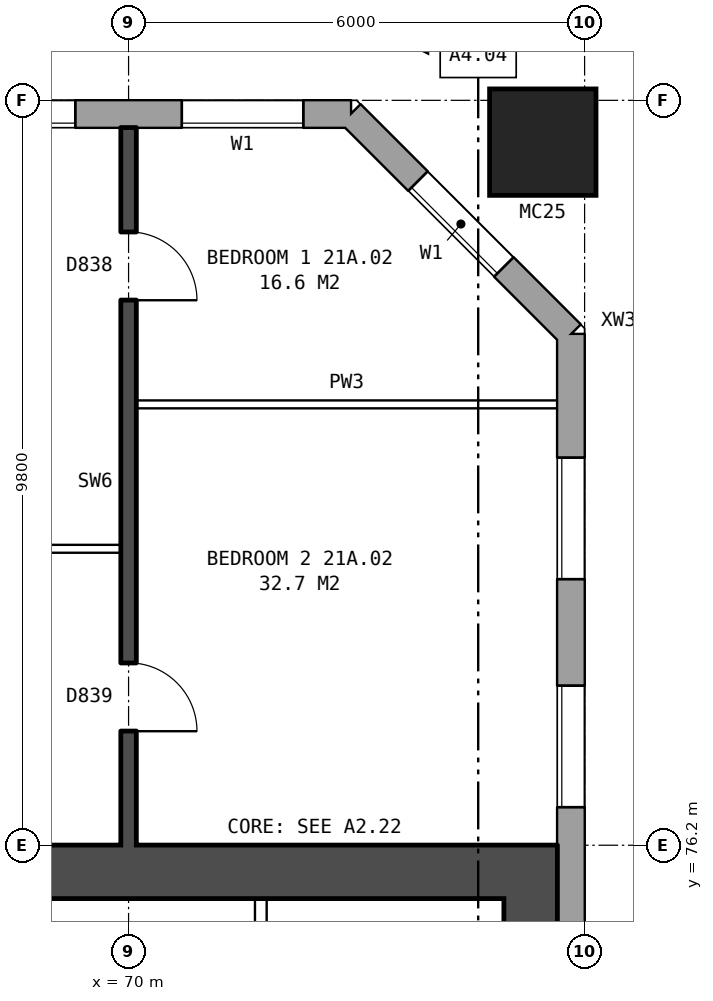
"""IFC4 building model, lengths in metres.
Left out: names, types, materials, properties, quantities, classifications, styles, units other than length and angle.
Written with IfcOpenShell. Run it as: python <this file> out.ifc"""

import sys

from ifc_helpers import new_model, si_unit, direction, frame, frame_2d, origin, origin_2d, place, context, subcontext, project, spatial, rectangle, hollow_rectangle, extrude, element, fill, save


model = new_model("IFC4")
c1 = context("Model", 3, precision=1e-05, world=origin(), true_north=direction((0.0, 1.0)))
c2 = subcontext(c1, "Body", "Model", "MODEL_VIEW")
j1 = project(units=[si_unit("LENGTHUNIT", "METRE"), si_unit("PLANEANGLEUNIT", "RADIAN")], contexts=[c1])
p1 = place(None, origin())
s1 = spatial("IfcSite", under=j1, at=p1, CompositionType="ELEMENT")
p2 = place(p1, origin())
s2 = spatial("IfcBuilding", under=s1, at=p2, CompositionType="ELEMENT")
p3 = place(p2, frame((0.0, 0.0, 77.8)))
s3 = spatial("IfcBuildingStorey", under=s2, at=p3, CompositionType="ELEMENT", Elevation=77.8)
p4 = place(p3, frame((75.45, 85.45, 0.0), z_axis=(0.0, 0.0, 1.0), x_axis=(1.0, 0.0, 0.0)))
e1 = element("IfcColumn", 1, at=p4, inside=s3, PredefinedType="COLUMN", context=c2, shape_type="SweptSolid", body=[
    extrude(hollow_rectangle(XDim=1.4, YDim=1.4, WallThickness=0.075, at=origin_2d()), origin(), (0.0, 0.0, 1.0), 3.1),
])
p5 = place(p3, frame((75.82, 57.075, 0.0), z_axis=(0.0, 0.0, 1.0), x_axis=(0.0, 1.0, 0.0)))
e2 = element("IfcWall", 2, at=p5, inside=s3, PredefinedType="STANDARD", context=c2, shape_type="SweptSolid", body=[
    extrude(rectangle(XDim=25.851, YDim=0.36, at=frame_2d((12.925, 0.0))), origin(), (0.0, 0.0, 1.0), 2.85),
])
p6 = place(p5, frame((1.625, 0.0, 0.8)))
e3 = element("IfcOpeningElement", 3, at=p6, cuts=e2, PredefinedType="OPENING", context=c2, shape_type="SweptSolid", body=[
    extrude(rectangle(XDim=1.6, YDim=1.8, at=frame_2d((0.8, 0.9))), frame((0.0, 0.19, 0.0), z_axis=(0.0, -1.0, 0.0), x_axis=(1.0, 0.0, 0.0)), (0.0, 0.0, 1.0), 0.38),
])
p7 = place(p5, frame((4.625, 0.0, 0.8)))
e4 = element("IfcOpeningElement", 4, at=p7, cuts=e2, PredefinedType="OPENING", context=c2, shape_type="SweptSolid", body=[
    extrude(rectangle(XDim=1.6, YDim=1.8, at=frame_2d((0.8, 0.9))), frame((0.0, 0.19, 0.0), z_axis=(0.0, -1.0, 0.0), x_axis=(1.0, 0.0, 0.0)), (0.0, 0.0, 1.0), 0.38),
])
p8 = place(p5, frame((19.625, 0.0, 0.8)))
e5 = element("IfcOpeningElement", 5, at=p8, cuts=e2, PredefinedType="OPENING", context=c2, shape_type="SweptSolid", body=[
    extrude(rectangle(XDim=1.6, YDim=1.8, at=frame_2d((0.8, 0.9))), frame((0.0, 0.19, 0.0), z_axis=(0.0, -1.0, 0.0), x_axis=(1.0, 0.0, 0.0)), (0.0, 0.0, 1.0), 0.38),
])
p9 = place(p5, frame((22.625, 0.0, 0.8)))
e6 = element("IfcOpeningElement", 6, at=p9, cuts=e2, PredefinedType="OPENING", context=c2, shape_type="SweptSolid", body=[
    extrude(rectangle(XDim=1.6, YDim=1.8, at=frame_2d((0.8, 0.9))), frame((0.0, 0.19, 0.0), z_axis=(0.0, -1.0, 0.0), x_axis=(1.0, 0.0, 0.0)), (0.0, 0.0, 1.0), 0.38),
])
p10 = place(p3, frame((75.82, 82.925, 0.0), z_axis=(0.0, 0.0, 1.0), x_axis=(-0.707106781187, 0.707106781187, 0.0)))
e7 = element("IfcWall", 7, at=p10, inside=s3, PredefinedType="STANDARD", context=c2, shape_type="SweptSolid", body=[
    extrude(rectangle(XDim=4.094, YDim=0.36, at=frame_2d((2.047, 0.0))), origin(), (0.0, 0.0, 1.0), 2.85),
])
p11 = place(p10, frame((1.247, 0.0, 0.8)))
e8 = element("IfcOpeningElement", 8, at=p11, cuts=e7, PredefinedType="OPENING", context=c2, shape_type="SweptSolid", body=[
    extrude(rectangle(XDim=1.6, YDim=1.8, at=frame_2d((0.8, 0.9))), frame((0.0, 0.19, 0.0), z_axis=(0.0, -1.0, 0.0), x_axis=(1.0, 0.0, 0.0)), (0.0, 0.0, 1.0), 0.38),
])
p12 = place(p3, frame((72.925, 85.82, 0.0), z_axis=(0.0, 0.0, 1.0), x_axis=(-1.0, 0.0, 0.0)))
e9 = element("IfcWall", 9, at=p12, inside=s3, PredefinedType="STANDARD", context=c2, shape_type="SweptSolid", body=[
    extrude(rectangle(XDim=46.601, YDim=0.36, at=frame_2d((23.3, 0.0))), origin(), (0.0, 0.0, 1.0), 2.85),
])
p13 = place(p12, frame((0.625, 0.0, 0.8)))
e10 = element("IfcOpeningElement", 10, at=p13, cuts=e9, PredefinedType="OPENING", context=c2, shape_type="SweptSolid", body=[
    extrude(rectangle(XDim=1.6, YDim=1.8, at=frame_2d((0.8, 0.9))), frame((0.0, 0.19, 0.0), z_axis=(0.0, -1.0, 0.0), x_axis=(1.0, 0.0, 0.0)), (0.0, 0.0, 1.0), 0.38),
])
p14 = place(p12, frame((3.625, 0.0, 0.8)))
e11 = element("IfcOpeningElement", 11, at=p14, cuts=e9, PredefinedType="OPENING", context=c2, shape_type="SweptSolid", body=[
    extrude(rectangle(XDim=1.6, YDim=1.8, at=frame_2d((0.8, 0.9))), frame((0.0, 0.19, 0.0), z_axis=(0.0, -1.0, 0.0), x_axis=(1.0, 0.0, 0.0)), (0.0, 0.0, 1.0), 0.38),
])
p15 = place(p12, frame((6.625, 0.0, 0.8)))
e12 = element("IfcOpeningElement", 12, at=p15, cuts=e9, PredefinedType="OPENING", context=c2, shape_type="SweptSolid", body=[
    extrude(rectangle(XDim=1.6, YDim=1.8, at=frame_2d((0.8, 0.9))), frame((0.0, 0.19, 0.0), z_axis=(0.0, -1.0, 0.0), x_axis=(1.0, 0.0, 0.0)), (0.0, 0.0, 1.0), 0.38),
])
p16 = place(p12, frame((9.125, 0.0, 1.65)))
e13 = element("IfcOpeningElement", 13, at=p16, cuts=e9, PredefinedType="OPENING", context=c2, shape_type="SweptSolid", body=[
    extrude(rectangle(XDim=1.4, YDim=0.9, at=frame_2d((0.7, 0.45))), frame((0.0, 0.19, 0.0), z_axis=(0.0, -1.0, 0.0), x_axis=(1.0, 0.0, 0.0)), (0.0, 0.0, 1.0), 0.38),
])
p17 = place(p12, frame((12.625, 0.0, 0.8)))
e14 = element("IfcOpeningElement", 14, at=p17, cuts=e9, PredefinedType="OPENING", context=c2, shape_type="SweptSolid", body=[
    extrude(rectangle(XDim=1.6, YDim=1.8, at=frame_2d((0.8, 0.9))), frame((0.0, 0.19, 0.0), z_axis=(0.0, -1.0, 0.0), x_axis=(1.0, 0.0, 0.0)), (0.0, 0.0, 1.0), 0.38),
])
p18 = place(p12, frame((15.625, 0.0, 0.8)))
e15 = element("IfcOpeningElement", 15, at=p18, cuts=e9, PredefinedType="OPENING", context=c2, shape_type="SweptSolid", body=[
    extrude(rectangle(XDim=1.6, YDim=1.8, at=frame_2d((0.8, 0.9))), frame((0.0, 0.19, 0.0), z_axis=(0.0, -1.0, 0.0), x_axis=(1.0, 0.0, 0.0)), (0.0, 0.0, 1.0), 0.38),
])
p19 = place(p12, frame((18.625, 0.0, 0.8)))
e16 = element("IfcOpeningElement", 16, at=p19, cuts=e9, PredefinedType="OPENING", context=c2, shape_type="SweptSolid", body=[
    extrude(rectangle(XDim=1.6, YDim=1.8, at=frame_2d((0.8, 0.9))), frame((0.0, 0.19, 0.0), z_axis=(0.0, -1.0, 0.0), x_axis=(1.0, 0.0, 0.0)), (0.0, 0.0, 1.0), 0.38),
])
p20 = place(p12, frame((21.625, 0.0, 0.8)))
e17 = element("IfcOpeningElement", 17, at=p20, cuts=e9, PredefinedType="OPENING", context=c2, shape_type="SweptSolid", body=[
    extrude(rectangle(XDim=1.6, YDim=1.8, at=frame_2d((0.8, 0.9))), frame((0.0, 0.19, 0.0), z_axis=(0.0, -1.0, 0.0), x_axis=(1.0, 0.0, 0.0)), (0.0, 0.0, 1.0), 0.38),
])
p21 = place(p12, frame((24.625, 0.0, 0.8)))
e18 = element("IfcOpeningElement", 18, at=p21, cuts=e9, PredefinedType="OPENING", context=c2, shape_type="SweptSolid", body=[
    extrude(rectangle(XDim=1.6, YDim=1.8, at=frame_2d((0.8, 0.9))), frame((0.0, 0.19, 0.0), z_axis=(0.0, -1.0, 0.0), x_axis=(1.0, 0.0, 0.0)), (0.0, 0.0, 1.0), 0.38),
])
p22 = place(p12, frame((27.625, 0.0, 0.8)))
e19 = element("IfcOpeningElement", 19, at=p22, cuts=e9, PredefinedType="OPENING", context=c2, shape_type="SweptSolid", body=[
    extrude(rectangle(XDim=1.6, YDim=1.8, at=frame_2d((0.8, 0.9))), frame((0.0, 0.19, 0.0), z_axis=(0.0, -1.0, 0.0), x_axis=(1.0, 0.0, 0.0)), (0.0, 0.0, 1.0), 0.38),
])
p23 = place(p12, frame((30.625, 0.0, 0.8)))
e20 = element("IfcOpeningElement", 20, at=p23, cuts=e9, PredefinedType="OPENING", context=c2, shape_type="SweptSolid", body=[
    extrude(rectangle(XDim=1.6, YDim=1.8, at=frame_2d((0.8, 0.9))), frame((0.0, 0.19, 0.0), z_axis=(0.0, -1.0, 0.0), x_axis=(1.0, 0.0, 0.0)), (0.0, 0.0, 1.0), 0.38),
])
p24 = place(p12, frame((33.125, 0.0, 0.75)))
e21 = element("IfcOpeningElement", 21, at=p24, cuts=e9, PredefinedType="OPENING", context=c2, shape_type="SweptSolid", body=[
    extrude(rectangle(XDim=0.6, YDim=1.8, at=frame_2d((0.3, 0.9))), frame((0.0, 0.19, 0.0), z_axis=(0.0, -1.0, 0.0), x_axis=(1.0, 0.0, 0.0)), (0.0, 0.0, 1.0), 0.38),
])
p25 = place(p12, frame((36.125, 0.0, 1.6)))
e22 = element("IfcOpeningElement", 22, at=p25, cuts=e9, PredefinedType="OPENING", context=c2, shape_type="SweptSolid", body=[
    extrude(rectangle(XDim=0.6, YDim=0.9, at=frame_2d((0.3, 0.45))), frame((0.0, 0.19, 0.0), z_axis=(0.0, -1.0, 0.0), x_axis=(1.0, 0.0, 0.0)), (0.0, 0.0, 1.0), 0.38),
])
p26 = place(p12, frame((39.625, 0.0, 0.8)))
e23 = element("IfcOpeningElement", 23, at=p26, cuts=e9, PredefinedType="OPENING", context=c2, shape_type="SweptSolid", body=[
    extrude(rectangle(XDim=1.6, YDim=1.8, at=frame_2d((0.8, 0.9))), frame((0.0, 0.19, 0.0), z_axis=(0.0, -1.0, 0.0), x_axis=(1.0, 0.0, 0.0)), (0.0, 0.0, 1.0), 0.38),
])
p27 = place(p12, frame((42.625, 0.0, 0.8)))
e24 = element("IfcOpeningElement", 24, at=p27, cuts=e9, PredefinedType="OPENING", context=c2, shape_type="SweptSolid", body=[
    extrude(rectangle(XDim=1.6, YDim=1.8, at=frame_2d((0.8, 0.9))), frame((0.0, 0.19, 0.0), z_axis=(0.0, -1.0, 0.0), x_axis=(1.0, 0.0, 0.0)), (0.0, 0.0, 1.0), 0.38),
])
p28 = place(p12, frame((11.125, 0.0, 0.15)))
e25 = element("IfcOpeningElement", 25, at=p28, cuts=e9, PredefinedType="OPENING", context=c2, shape_type="SweptSolid", body=[
    extrude(rectangle(XDim=0.6, YDim=0.9, at=frame_2d((0.3, 0.45))), frame((0.0, 0.19, 0.0), z_axis=(0.0, -1.0, 0.0), x_axis=(1.0, 0.0, 0.0)), (0.0, 0.0, 1.0), 0.38),
])
p29 = place(p12, frame((34.025, 0.0, 0.65)))
e26 = element("IfcOpeningElement", 26, at=p29, cuts=e9, PredefinedType="OPENING", context=c2, shape_type="SweptSolid", body=[
    extrude(rectangle(XDim=0.8, YDim=0.9, at=frame_2d((0.4, 0.45))), frame((0.0, 0.19, 0.0), z_axis=(0.0, -1.0, 0.0), x_axis=(1.0, 0.0, 0.0)), (0.0, 0.0, 1.0), 0.38),
])
p30 = place(p12, frame((37.025, 0.0, 0.8)))
e27 = element("IfcOpeningElement", 27, at=p30, cuts=e9, PredefinedType="OPENING", context=c2, shape_type="SweptSolid", body=[
    extrude(rectangle(XDim=1.6, YDim=1.8, at=frame_2d((0.8, 0.9))), frame((0.0, 0.19, 0.0), z_axis=(0.0, -1.0, 0.0), x_axis=(1.0, 0.0, 0.0)), (0.0, 0.0, 1.0), 0.38),
])
p31 = place(p3, frame((75.29, 64.5, 0.0), z_axis=(0.0, 0.0, 1.0), x_axis=(0.0, 1.0, 0.0)))
e28 = element("IfcWall", 28, at=p31, inside=s3, PredefinedType="SHEAR", context=c2, shape_type="SweptSolid", body=[
    extrude(rectangle(XDim=11.0, YDim=0.7, at=frame_2d((5.5, 0.0))), origin(), (0.0, 0.0, 1.0), 2.85),
])
p32 = place(p3, frame((66.64, 75.85, 0.0), z_axis=(0.0, 0.0, 1.0), x_axis=(1.0, 0.0, 0.0)))
e29 = element("IfcWall", 29, at=p32, inside=s3, PredefinedType="SHEAR", context=c2, shape_type="SweptSolid", body=[
    extrude(rectangle(XDim=9.0, YDim=0.7, at=frame_2d((4.5, 0.0))), origin(), (0.0, 0.0, 1.0), 2.85),
])
p33 = place(p3, frame((71.74, 73.45, 0.0), z_axis=(0.0, 0.0, 1.0), x_axis=(0.0, 1.0, 0.0)))
e30 = element("IfcWall", 30, at=p33, inside=s3, PredefinedType="PARTITIONING", context=c2, shape_type="SweptSolid", body=[
    extrude(rectangle(XDim=2.05, YDim=0.15, at=frame_2d((1.025, 0.0))), origin(), (0.0, 0.0, 1.0), 2.85),
])
p34 = place(p33, frame((0.6, 0.0, 0.0)))
e31 = element("IfcOpeningElement", 31, at=p34, cuts=e30, PredefinedType="OPENING", context=c2, shape_type="SweptSolid", body=[
    extrude(rectangle(XDim=0.85, YDim=2.1, at=frame_2d((0.425, 1.05))), frame((0.0, 0.085, 0.0), z_axis=(0.0, -1.0, 0.0), x_axis=(1.0, 0.0, 0.0)), (0.0, 0.0, 1.0), 0.17),
])
p35 = place(p3, frame((64.1, 80.1, 0.0), z_axis=(0.0, 0.0, 1.0), x_axis=(1.0, 0.0, 0.0)))
e32 = element("IfcWall", 32, at=p35, inside=s3, PredefinedType="PARTITIONING", context=c2, shape_type="SweptSolid", body=[
    extrude(rectangle(XDim=5.8, YDim=0.1, at=frame_2d((2.9, 0.0))), origin(), (0.0, 0.0, 1.0), 2.85),
])
p36 = place(p35, frame((3.6, 0.0, 0.0)))
e33 = element("IfcOpeningElement", 33, at=p36, cuts=e32, PredefinedType="OPENING", context=c2, shape_type="SweptSolid", body=[
    extrude(rectangle(XDim=0.9, YDim=2.1, at=frame_2d((0.45, 1.05))), frame((0.0, 0.06, 0.0), z_axis=(0.0, -1.0, 0.0), x_axis=(1.0, 0.0, 0.0)), (0.0, 0.0, 1.0), 0.12),
])
p37 = place(p35, frame((0.7, 0.0, 0.0)))
e34 = element("IfcOpeningElement", 34, at=p37, cuts=e32, PredefinedType="OPENING", context=c2, shape_type="SweptSolid", body=[
    extrude(rectangle(XDim=0.9, YDim=2.1, at=frame_2d((0.45, 1.05))), frame((0.0, 0.06, 0.0), z_axis=(0.0, -1.0, 0.0), x_axis=(1.0, 0.0, 0.0)), (0.0, 0.0, 1.0), 0.12),
])
p38 = place(p3, frame((70.1, 82.0, 0.0), z_axis=(0.0, 0.0, 1.0), x_axis=(1.0, 0.0, 0.0)))
e35 = element("IfcWall", 35, at=p38, inside=s3, PredefinedType="PARTITIONING", context=c2, shape_type="SweptSolid", body=[
    extrude(rectangle(XDim=5.54, YDim=0.1, at=frame_2d((2.77, 0.0))), origin(), (0.0, 0.0, 1.0), 2.85),
])
p39 = place(p3, frame((70.0, 76.2, 0.0), z_axis=(0.0, 0.0, 1.0), x_axis=(0.0, 1.0, 0.0)))
e36 = element("IfcWall", 36, at=p39, inside=s3, PredefinedType="SOLIDWALL", context=c2, shape_type="SweptSolid", body=[
    extrude(rectangle(XDim=9.44, YDim=0.2, at=frame_2d((4.72, 0.0))), origin(), (0.0, 0.0, 1.0), 2.85),
])
p40 = place(p39, frame((7.17, 0.0, 0.0)))
e37 = element("IfcOpeningElement", 37, at=p40, cuts=e36, PredefinedType="OPENING", context=c2, shape_type="SweptSolid", body=[
    extrude(rectangle(XDim=0.9, YDim=2.1, at=frame_2d((0.45, 1.05))), frame((0.0, 0.11, 0.0), z_axis=(0.0, -1.0, 0.0), x_axis=(1.0, 0.0, 0.0)), (0.0, 0.0, 1.0), 0.22),
])
p41 = place(p39, frame((1.5, 0.0, 0.0)))
e38 = element("IfcOpeningElement", 38, at=p41, cuts=e36, PredefinedType="OPENING", context=c2, shape_type="SweptSolid", body=[
    extrude(rectangle(XDim=0.9, YDim=2.1, at=frame_2d((0.45, 1.05))), frame((0.0, 0.11, 0.0), z_axis=(0.0, -1.0, 0.0), x_axis=(1.0, 0.0, 0.0)), (0.0, 0.0, 1.0), 0.22),
])
p42 = place(p8, origin())
e39 = element("IfcWindow", 39, at=p42, inside=s3, PartitioningType="SINGLE_PANEL", PredefinedType="WINDOW", context=c2, shape_type="SweptSolid", body=[
    extrude(rectangle(XDim=1.6, YDim=1.8, at=frame_2d((0.8, 0.9))), frame((0.0, 0.15, 0.0), z_axis=(0.0, -1.0, 0.0), x_axis=(1.0, 0.0, 0.0)), (0.0, 0.0, 1.0), 0.06),
])
fill(e5, e39)
p43 = place(p9, origin())
e40 = element("IfcWindow", 40, at=p43, inside=s3, PartitioningType="SINGLE_PANEL", PredefinedType="WINDOW", context=c2, shape_type="SweptSolid", body=[
    extrude(rectangle(XDim=1.6, YDim=1.8, at=frame_2d((0.8, 0.9))), frame((0.0, 0.15, 0.0), z_axis=(0.0, -1.0, 0.0), x_axis=(1.0, 0.0, 0.0)), (0.0, 0.0, 1.0), 0.06),
])
fill(e6, e40)
p44 = place(p11, origin())
e41 = element("IfcWindow", 41, at=p44, inside=s3, PartitioningType="SINGLE_PANEL", PredefinedType="WINDOW", context=c2, shape_type="SweptSolid", body=[
    extrude(rectangle(XDim=1.6, YDim=1.8, at=frame_2d((0.8, 0.9))), frame((0.0, 0.15, 0.0), z_axis=(0.0, -1.0, 0.0), x_axis=(1.0, 0.0, 0.0)), (0.0, 0.0, 1.0), 0.06),
])
fill(e8, e41)
p45 = place(p13, origin())
e42 = element("IfcWindow", 42, at=p45, inside=s3, PartitioningType="SINGLE_PANEL", PredefinedType="WINDOW", context=c2, shape_type="SweptSolid", body=[
    extrude(rectangle(XDim=1.6, YDim=1.8, at=frame_2d((0.8, 0.9))), frame((0.0, 0.15, 0.0), z_axis=(0.0, -1.0, 0.0), x_axis=(1.0, 0.0, 0.0)), (0.0, 0.0, 1.0), 0.06),
])
fill(e10, e42)
p46 = place(p14, origin())
e43 = element("IfcWindow", 43, at=p46, inside=s3, PartitioningType="SINGLE_PANEL", PredefinedType="WINDOW", context=c2, shape_type="SweptSolid", body=[
    extrude(rectangle(XDim=1.6, YDim=1.8, at=frame_2d((0.8, 0.9))), frame((0.0, 0.15, 0.0), z_axis=(0.0, -1.0, 0.0), x_axis=(1.0, 0.0, 0.0)), (0.0, 0.0, 1.0), 0.06),
])
fill(e11, e43)
p47 = place(p40, frame((0.9, 0.0, 0.0), z_axis=(0.0, 0.0, 1.0), x_axis=(-1.0, 0.0, 0.0)))
e44 = element("IfcDoor", 44, at=p47, inside=s3, OperationType="SINGLE_SWING_RIGHT", PredefinedType="DOOR", context=c2, shape_type="SweptSolid", body=[
    extrude(rectangle(XDim=0.9, YDim=2.1, at=frame_2d((0.45, 1.05))), frame((0.0, 0.025, 0.0), z_axis=(0.0, -1.0, 0.0), x_axis=(1.0, 0.0, 0.0)), (0.0, 0.0, 1.0), 0.05),
])
fill(e37, e44)
p48 = place(p41, frame((0.9, 0.0, 0.0), z_axis=(0.0, 0.0, 1.0), x_axis=(-1.0, 0.0, 0.0)))
e45 = element("IfcDoor", 45, at=p48, inside=s3, OperationType="SINGLE_SWING_RIGHT", PredefinedType="DOOR", context=c2, shape_type="SweptSolid", body=[
    extrude(rectangle(XDim=0.9, YDim=2.1, at=frame_2d((0.45, 1.05))), frame((0.0, 0.025, 0.0), z_axis=(0.0, -1.0, 0.0), x_axis=(1.0, 0.0, 0.0)), (0.0, 0.0, 1.0), 0.05),
])
fill(e38, e45)
save(model, sys.argv[1])
